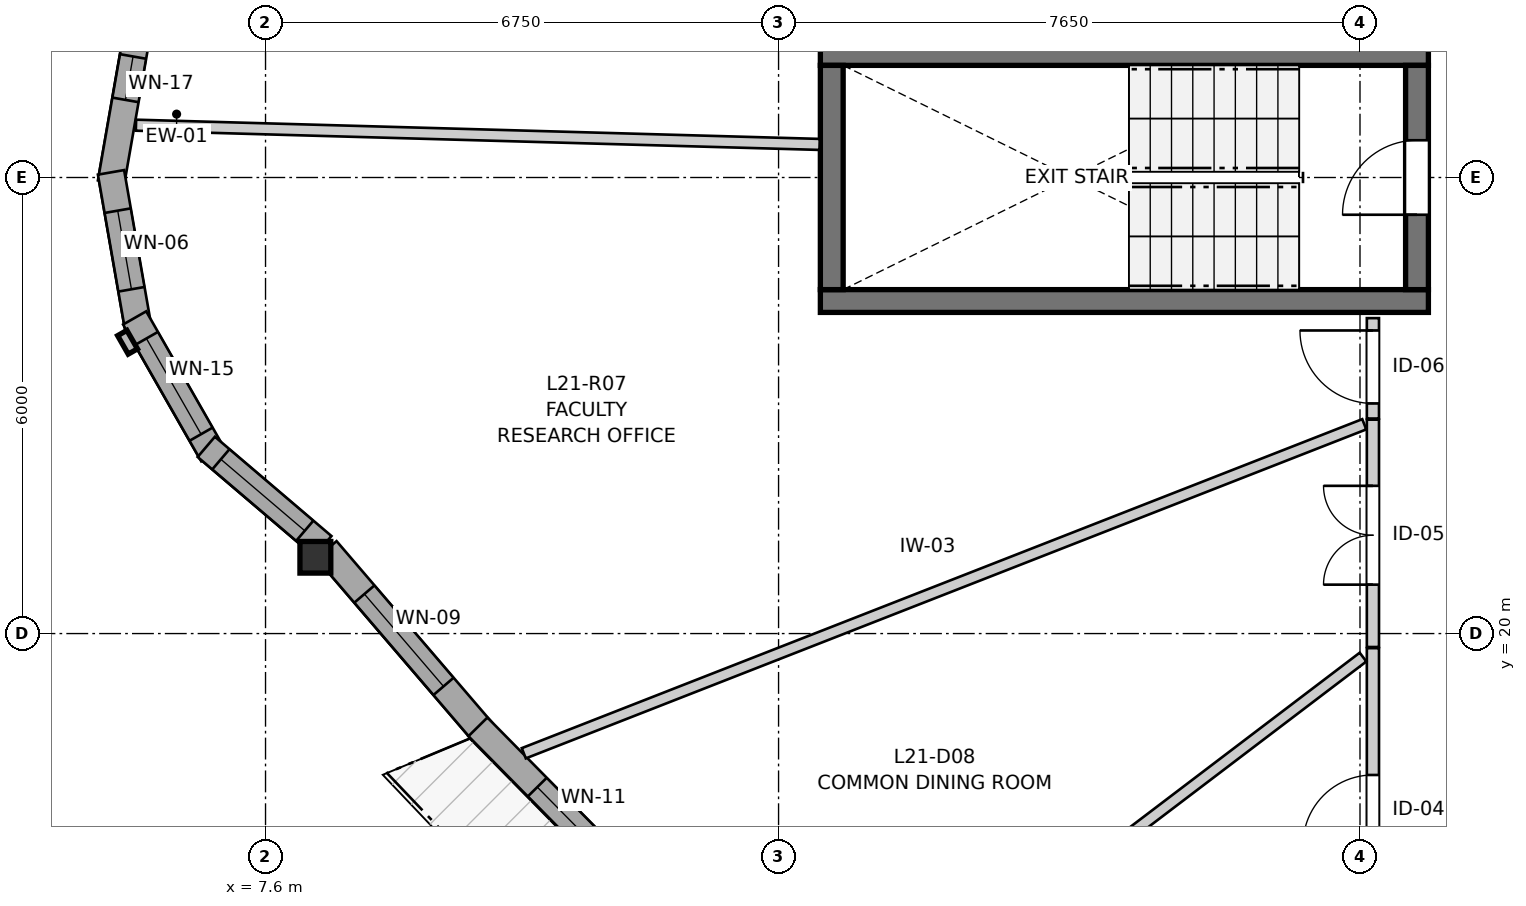
"""IFC4 building model, lengths in metres.
Left out: names, types, materials, properties, quantities, classifications, styles, units other than length and angle.
Written with IfcOpenShell. Run it as: python <this file> out.ifc"""

import sys

from ifc_helpers import new_model, si_unit, direction, frame, frame_2d, origin, origin_2d, place, context, subcontext, project, spatial, rectangle, i_section, extrude, source, transform, mapped, element, fill, save


model = new_model("IFC4")
c1 = context("Model", 3, precision=1e-05, world=origin(), true_north=direction((0.0, 1.0)))
c2 = subcontext(c1, "Body", "Model", "MODEL_VIEW")
j1 = project(units=[si_unit("LENGTHUNIT", "METRE"), si_unit("PLANEANGLEUNIT", "RADIAN")], contexts=[c1])
p1 = place(None, origin())
s1 = spatial("IfcSite", under=j1, at=p1, CompositionType="ELEMENT")
p2 = place(p1, origin())
s2 = spatial("IfcBuilding", under=s1, at=p2, CompositionType="ELEMENT")
p3 = place(p2, frame((0.0, 0.0, 73.6)))
s3 = spatial("IfcBuildingStorey", under=s2, at=p3, CompositionType="ELEMENT", Elevation=73.6)
for number, where, z_axis, x_axis in (
    (1, (14.9, 24.375, 0.0), (0.0, 0.0, 1.0), (1.0, 0.0, 0.0)),
    (2, (22.9, 27.625, 0.0), (0.0, 0.0, 1.0), (-1.0, 0.0, 0.0)),
):
    element("IfcWall", number, at=place(p3, frame(where, z_axis=z_axis, x_axis=x_axis)), inside=s3, PredefinedType="SHEAR", context=c2, shape_type="SweptSolid", body=[
        extrude(rectangle(XDim=8.0, YDim=0.3, at=frame_2d((4.0, 0.0))), origin(), (0.0, 0.0, 1.0), 2.95),
    ])
p4 = place(p3, frame((15.05, 27.475, 0.0), z_axis=(0.0, 0.0, 1.0), x_axis=(0.0, -1.0, 0.0)))
e3 = element("IfcWall", 3, at=p4, inside=s3, PredefinedType="SHEAR", context=c2, shape_type="SweptSolid", body=[
    extrude(rectangle(XDim=2.95, YDim=0.3, at=frame_2d((1.475, 0.0))), origin(), (0.0, 0.0, 1.0), 2.95),
])
p5 = place(p3, frame((22.75, 24.525, 0.0), z_axis=(0.0, 0.0, 1.0), x_axis=(0.0, 1.0, 0.0)))
e4 = element("IfcWall", 4, at=p5, inside=s3, PredefinedType="SHEAR", context=c2, shape_type="SweptSolid", body=[
    extrude(rectangle(XDim=2.95, YDim=0.3, at=frame_2d((1.475, 0.0))), origin(), (0.0, 0.0, 1.0), 2.95),
])
p6 = place(p5, frame((0.985, 0.0, 0.0)))
e5 = element("IfcOpeningElement", 5, at=p6, cuts=e4, PredefinedType="OPENING", context=c2, shape_type="SweptSolid", body=[
    extrude(rectangle(XDim=0.98, YDim=2.15, at=frame_2d((0.49, 1.075))), frame((0.0, 0.16, 0.0), z_axis=(0.0, -1.0, 0.0), x_axis=(1.0, 0.0, 0.0)), (0.0, 0.0, 1.0), 0.32),
])
m1 = source(origin(), c2, "Body", "SweptSolid", [
    extrude(i_section(OverallWidth=0.406, OverallDepth=0.416, WebThickness=0.027, FlangeThickness=0.044, FilletRadius=0.015, at=origin_2d()), origin(), (0.0, 0.0, 1.0), 2.95),
])
p7 = place(p3, frame((8.256, 21.003, 0.0), z_axis=(0.0, 0.0, 1.0), x_axis=(1.0, 0.0, 0.0)))
e6 = element("IfcColumn", 6, at=p7, inside=s3, PredefinedType="PILASTER", context=c2, shape_type="MappedRepresentation", body=[
    mapped(m1, transform((0.0, 0.0, 0.0), x_axis=(1.0, 0.0, 0.0), y_axis=(0.0, 1.0, 0.0), z_axis=(0.0, 0.0, 1.0), scale=1.0)),
])
p8 = place(p3, frame((5.924, 27.975, 0.0), z_axis=(0.0, 0.0, 1.0), x_axis=(-0.172166087538, -0.985067935881, 0.0)))
e7 = element("IfcWall", 7, at=p8, inside=s3, PredefinedType="SOLIDWALL", context=c2, shape_type="SweptSolid", body=[
    extrude(rectangle(XDim=2.073, YDim=0.35, at=frame_2d((1.037, 0.0))), origin(), (0.0, 0.0, 1.0), 2.48),
])
p9 = place(p8, frame((0.388, 0.0, 0.82)))
e8 = element("IfcOpeningElement", 8, at=p9, cuts=e7, PredefinedType="OPENING", context=c2, shape_type="SweptSolid", body=[
    extrude(rectangle(XDim=0.58, YDim=1.35, at=frame_2d((0.29, 0.675))), frame((0.0, 0.185, 0.0), z_axis=(0.0, -1.0, 0.0), x_axis=(1.0, 0.0, 0.0)), (0.0, 0.0, 1.0), 0.37),
])
p10 = place(p3, frame((5.567, 26.068, 0.0), z_axis=(0.0, 0.0, 1.0), x_axis=(0.172166087538, -0.985067935881, 0.0)))
e9 = element("IfcWall", 9, at=p10, inside=s3, PredefinedType="SOLIDWALL", context=c2, shape_type="SweptSolid", body=[
    extrude(rectangle(XDim=2.073, YDim=0.35, at=frame_2d((1.037, 0.0))), origin(), (0.0, 0.0, 1.0), 2.48),
])
p11 = place(p10, frame((0.511, 0.0, 0.82)))
e10 = element("IfcOpeningElement", 10, at=p11, cuts=e9, PredefinedType="OPENING", context=c2, shape_type="SweptSolid", body=[
    extrude(rectangle(XDim=1.05, YDim=1.45, at=frame_2d((0.525, 0.725))), frame((0.0, 0.185, 0.0), z_axis=(0.0, -1.0, 0.0), x_axis=(1.0, 0.0, 0.0)), (0.0, 0.0, 1.0), 0.37),
])
p12 = place(p3, frame((5.878, 24.153, 0.0), z_axis=(0.0, 0.0, 1.0), x_axis=(0.496037473582, -0.868301114132, 0.0)))
e11 = element("IfcWall", 11, at=p12, inside=s3, PredefinedType="SOLIDWALL", context=c2, shape_type="SweptSolid", body=[
    extrude(rectangle(XDim=2.073, YDim=0.35, at=frame_2d((1.037, 0.0))), origin(), (0.0, 0.0, 1.0), 2.48),
])
p13 = place(p12, frame((0.312, 0.0, 0.82)))
e12 = element("IfcOpeningElement", 12, at=p13, cuts=e11, PredefinedType="OPENING", context=c2, shape_type="SweptSolid", body=[
    extrude(rectangle(XDim=1.45, YDim=1.25, at=frame_2d((0.725, 0.625))), frame((0.0, 0.185, 0.0), z_axis=(0.0, -1.0, 0.0), x_axis=(1.0, 0.0, 0.0)), (0.0, 0.0, 1.0), 0.37),
])
p14 = place(p3, frame((6.82, 22.457, 0.0), z_axis=(0.0, 0.0, 1.0), x_axis=(0.76114353683, -0.648583469063, 0.0)))
e13 = element("IfcWall", 13, at=p14, inside=s3, PredefinedType="SOLIDWALL", context=c2, shape_type="SweptSolid", body=[
    extrude(rectangle(XDim=2.015, YDim=0.35, at=frame_2d((1.007, 0.0))), origin(), (0.0, 0.0, 1.0), 2.48),
])
p15 = place(p14, frame((0.252, 0.0, 0.82)))
e14 = element("IfcOpeningElement", 14, at=p15, cuts=e13, PredefinedType="OPENING", context=c2, shape_type="SweptSolid", body=[
    extrude(rectangle(XDim=1.45, YDim=1.25, at=frame_2d((0.725, 0.625))), frame((0.0, 0.185, 0.0), z_axis=(0.0, -1.0, 0.0), x_axis=(1.0, 0.0, 0.0)), (0.0, 0.0, 1.0), 0.37),
])
p16 = place(p3, frame((8.402, 21.102, 0.0), z_axis=(0.0, 0.0, 1.0), x_axis=(0.650797748491, -0.759251138004, 0.0)))
e15 = element("IfcWall", 15, at=p16, inside=s3, PredefinedType="SOLIDWALL", context=c2, shape_type="SweptSolid", body=[
    extrude(rectangle(XDim=3.154, YDim=0.35, at=frame_2d((1.577, 0.0))), origin(), (0.0, 0.0, 1.0), 2.48),
])
p17 = place(p16, frame((0.767, 0.0, 0.82)))
e16 = element("IfcOpeningElement", 16, at=p17, cuts=e15, PredefinedType="OPENING", context=c2, shape_type="SweptSolid", body=[
    extrude(rectangle(XDim=1.6, YDim=1.35, at=frame_2d((0.8, 0.675))), frame((0.0, 0.185, 0.0), z_axis=(0.0, -1.0, 0.0), x_axis=(1.0, 0.0, 0.0)), (0.0, 0.0, 1.0), 0.37),
])
p18 = place(p3, frame((10.394, 18.773, 0.0), z_axis=(0.0, 0.0, 1.0), x_axis=(0.701965316192, -0.712211130819, 0.0)))
e17 = element("IfcWall", 17, at=p18, inside=s3, PredefinedType="SOLIDWALL", context=c2, shape_type="SweptSolid", body=[
    extrude(rectangle(XDim=2.883, YDim=0.35, at=frame_2d((1.442, 0.0))), origin(), (0.0, 0.0, 1.0), 2.48),
])
p19 = place(p18, frame((1.113, 0.0, 0.82)))
e18 = element("IfcOpeningElement", 18, at=p19, cuts=e17, PredefinedType="OPENING", context=c2, shape_type="SweptSolid", body=[
    extrude(rectangle(XDim=1.25, YDim=1.35, at=frame_2d((0.625, 0.675))), frame((0.0, 0.185, 0.0), z_axis=(0.0, -1.0, 0.0), x_axis=(1.0, 0.0, 0.0)), (0.0, 0.0, 1.0), 0.37),
])
p20 = place(p3, frame((22.17, 15.57, 0.0), z_axis=(0.0, 0.0, 1.0), x_axis=(0.0, 1.0, 0.0)))
e19 = element("IfcWall", 19, at=p20, inside=s3, PredefinedType="PARTITIONING", context=c2, shape_type="SweptSolid", body=[
    extrude(rectangle(XDim=4.238, YDim=0.16, at=frame_2d((2.119, 0.0))), origin(), (0.0, 0.0, 1.0), 2.95),
])
p21 = place(p20, frame((1.649, 0.0, 0.0)))
e20 = element("IfcOpeningElement", 20, at=p21, cuts=e19, PredefinedType="OPENING", context=c2, shape_type="SweptSolid", body=[
    extrude(rectangle(XDim=0.92, YDim=2.1, at=frame_2d((0.46, 1.05))), frame((0.0, 0.09, 0.0), z_axis=(0.0, -1.0, 0.0), x_axis=(1.0, 0.0, 0.0)), (0.0, 0.0, 1.0), 0.18),
])
p22 = place(p3, frame((22.17, 19.823, 0.0), z_axis=(0.0, 0.0, 1.0), x_axis=(0.0, 1.0, 0.0)))
e21 = element("IfcWall", 21, at=p22, inside=s3, PredefinedType="PARTITIONING", context=c2, shape_type="SweptSolid", body=[
    extrude(rectangle(XDim=2.991, YDim=0.16, at=frame_2d((1.496, 0.0))), origin(), (0.0, 0.0, 1.0), 2.95),
])
p23 = place(p22, frame((0.821, 0.0, 0.0)))
e22 = element("IfcOpeningElement", 22, at=p23, cuts=e21, PredefinedType="OPENING", context=c2, shape_type="SweptSolid", body=[
    extrude(rectangle(XDim=1.3, YDim=2.1, at=frame_2d((0.65, 1.05))), frame((0.0, 0.09, 0.0), z_axis=(0.0, -1.0, 0.0), x_axis=(1.0, 0.0, 0.0)), (0.0, 0.0, 1.0), 0.18),
])
p24 = place(p3, frame((22.17, 22.829, 0.0), z_axis=(0.0, 0.0, 1.0), x_axis=(0.0, 1.0, 0.0)))
e23 = element("IfcWall", 23, at=p24, inside=s3, PredefinedType="PARTITIONING", context=c2, shape_type="SweptSolid", body=[
    extrude(rectangle(XDim=1.321, YDim=0.16, at=frame_2d((0.66, 0.0))), origin(), (0.0, 0.0, 1.0), 2.95),
])
p25 = place(p24, frame((0.198, 0.0, 0.0)))
e24 = element("IfcOpeningElement", 24, at=p25, cuts=e23, PredefinedType="OPENING", context=c2, shape_type="SweptSolid", body=[
    extrude(rectangle(XDim=0.96, YDim=2.1, at=frame_2d((0.48, 1.05))), frame((0.0, 0.09, 0.0), z_axis=(0.0, -1.0, 0.0), x_axis=(1.0, 0.0, 0.0)), (0.0, 0.0, 1.0), 0.18),
])
p26 = place(p3, frame((10.998, 18.425, 0.0), z_axis=(0.0, 0.0, 1.0), x_axis=(0.931213049878, 0.364475315676, 0.0)))
e25 = element("IfcWall", 25, at=p26, inside=s3, PredefinedType="PARTITIONING", context=c2, shape_type="SweptSolid", body=[
    extrude(rectangle(XDim=11.875, YDim=0.145, at=frame_2d((5.938, 0.0))), origin(), (0.0, 0.0, 1.0), 2.95),
])
p27 = place(p3, frame((5.896, 26.688, 0.0), z_axis=(0.0, 0.0, 1.0), x_axis=(0.999604843423, -0.028109731489, 0.0)))
e26 = element("IfcWall", 26, at=p27, inside=s3, PredefinedType="PARTITIONING", context=c2, shape_type="SweptSolid", body=[
    extrude(rectangle(XDim=8.998, YDim=0.145, at=frame_2d((4.499, 0.0))), origin(), (0.0, 0.0, 1.0), 2.95),
])
p28 = place(p3, frame((15.239, 14.526, 0.0), z_axis=(0.0, 0.0, 1.0), x_axis=(0.796393529077, 0.604778758592, 0.0)))
e27 = element("IfcWall", 27, at=p28, inside=s3, PredefinedType="PARTITIONING", context=c2, shape_type="SweptSolid", body=[
    extrude(rectangle(XDim=8.539, YDim=0.145, at=frame_2d((4.27, 0.0))), origin(), (0.0, 0.0, 1.0), 2.95),
])
m2 = source(origin(), c2, "Body", "SweptSolid", [
    extrude(rectangle(XDim=0.58, YDim=1.35, at=frame_2d((0.29, 0.675))), frame((0.0, 0.03, 0.0), z_axis=(0.0, -1.0, 0.0), x_axis=(1.0, 0.0, 0.0)), (0.0, 0.0, 1.0), 0.06),
])
p29 = place(p9, origin())
e28 = element("IfcWindow", 28, at=p29, inside=s3, PartitioningType="SINGLE_PANEL", PredefinedType="WINDOW", context=c2, shape_type="MappedRepresentation", body=[
    mapped(m2, transform((0.0, 0.0, 0.0), x_axis=(1.0, 0.0, 0.0), y_axis=(0.0, 1.0, 0.0), z_axis=(0.0, 0.0, 1.0), scale=1.0)),
])
fill(e8, e28)
m3 = source(origin(), c2, "Body", "SweptSolid", [
    extrude(rectangle(XDim=1.05, YDim=1.45, at=frame_2d((0.525, 0.725))), frame((0.0, 0.03, 0.0), z_axis=(0.0, -1.0, 0.0), x_axis=(1.0, 0.0, 0.0)), (0.0, 0.0, 1.0), 0.06),
])
p30 = place(p11, origin())
e29 = element("IfcWindow", 29, at=p30, inside=s3, PartitioningType="SINGLE_PANEL", PredefinedType="WINDOW", context=c2, shape_type="MappedRepresentation", body=[
    mapped(m3, transform((0.0, 0.0, 0.0), x_axis=(1.0, 0.0, 0.0), y_axis=(0.0, 1.0, 0.0), z_axis=(0.0, 0.0, 1.0), scale=1.0)),
])
fill(e10, e29)
m4 = source(origin(), c2, "Body", "SweptSolid", [
    extrude(rectangle(XDim=1.45, YDim=1.25, at=frame_2d((0.725, 0.625))), frame((0.0, 0.03, 0.0), z_axis=(0.0, -1.0, 0.0), x_axis=(1.0, 0.0, 0.0)), (0.0, 0.0, 1.0), 0.06),
])
p31 = place(p13, origin())
e30 = element("IfcWindow", 30, at=p31, inside=s3, PartitioningType="SINGLE_PANEL", PredefinedType="WINDOW", context=c2, shape_type="MappedRepresentation", body=[
    mapped(m4, transform((0.0, 0.0, 0.0), x_axis=(1.0, 0.0, 0.0), y_axis=(0.0, 1.0, 0.0), z_axis=(0.0, 0.0, 1.0), scale=1.0)),
])
fill(e12, e30)
p32 = place(p15, origin())
e31 = element("IfcWindow", 31, at=p32, inside=s3, PartitioningType="SINGLE_PANEL", PredefinedType="WINDOW", context=c2, shape_type="MappedRepresentation", body=[
    mapped(m4, transform((0.0, 0.0, 0.0), x_axis=(1.0, 0.0, 0.0), y_axis=(0.0, 1.0, 0.0), z_axis=(0.0, 0.0, 1.0), scale=1.0)),
])
fill(e14, e31)
m5 = source(origin(), c2, "Body", "SweptSolid", [
    extrude(rectangle(XDim=1.6, YDim=1.35, at=frame_2d((0.8, 0.675))), frame((0.0, 0.03, 0.0), z_axis=(0.0, -1.0, 0.0), x_axis=(1.0, 0.0, 0.0)), (0.0, 0.0, 1.0), 0.06),
])
p33 = place(p17, origin())
e32 = element("IfcWindow", 32, at=p33, inside=s3, PartitioningType="SINGLE_PANEL", PredefinedType="WINDOW", context=c2, shape_type="MappedRepresentation", body=[
    mapped(m5, transform((0.0, 0.0, 0.0), x_axis=(1.0, 0.0, 0.0), y_axis=(0.0, 1.0, 0.0), z_axis=(0.0, 0.0, 1.0), scale=1.0)),
])
fill(e16, e32)
m6 = source(origin(), c2, "Body", "SweptSolid", [
    extrude(rectangle(XDim=1.25, YDim=1.35, at=frame_2d((0.625, 0.675))), frame((0.0, 0.03, 0.0), z_axis=(0.0, -1.0, 0.0), x_axis=(1.0, 0.0, 0.0)), (0.0, 0.0, 1.0), 0.06),
])
p34 = place(p19, origin())
e33 = element("IfcWindow", 33, at=p34, inside=s3, PartitioningType="SINGLE_PANEL", PredefinedType="WINDOW", context=c2, shape_type="MappedRepresentation", body=[
    mapped(m6, transform((0.0, 0.0, 0.0), x_axis=(1.0, 0.0, 0.0), y_axis=(0.0, 1.0, 0.0), z_axis=(0.0, 0.0, 1.0), scale=1.0)),
])
fill(e18, e33)
m7 = source(origin(), c2, "Body", "SweptSolid", [
    extrude(rectangle(XDim=0.98, YDim=2.15, at=frame_2d((0.49, 1.075))), frame((0.0, 0.025, 0.0), z_axis=(0.0, -1.0, 0.0), x_axis=(1.0, 0.0, 0.0)), (0.0, 0.0, 1.0), 0.05),
])
p35 = place(p6, origin())
e34 = element("IfcDoor", 34, at=p35, inside=s3, OperationType="SINGLE_SWING_LEFT", PredefinedType="DOOR", context=c2, shape_type="MappedRepresentation", body=[
    mapped(m7, transform((0.0, 0.0, 0.0), x_axis=(1.0, 0.0, 0.0), y_axis=(0.0, 1.0, 0.0), z_axis=(0.0, 0.0, 1.0), scale=1.0)),
])
fill(e5, e34)
m8 = source(origin(), c2, "Body", "SweptSolid", [
    extrude(rectangle(XDim=0.92, YDim=2.1, at=frame_2d((0.46, 1.05))), frame((0.0, 0.025, 0.0), z_axis=(0.0, -1.0, 0.0), x_axis=(1.0, 0.0, 0.0)), (0.0, 0.0, 1.0), 0.05),
])
p36 = place(p21, origin())
e35 = element("IfcDoor", 35, at=p36, inside=s3, OperationType="SINGLE_SWING_LEFT", PredefinedType="DOOR", context=c2, shape_type="MappedRepresentation", body=[
    mapped(m8, transform((0.0, 0.0, 0.0), x_axis=(1.0, 0.0, 0.0), y_axis=(0.0, 1.0, 0.0), z_axis=(0.0, 0.0, 1.0), scale=1.0)),
])
fill(e20, e35)
m9 = source(origin(), c2, "Body", "SweptSolid", [
    extrude(rectangle(XDim=1.3, YDim=2.1, at=frame_2d((0.65, 1.05))), frame((0.0, 0.025, 0.0), z_axis=(0.0, -1.0, 0.0), x_axis=(1.0, 0.0, 0.0)), (0.0, 0.0, 1.0), 0.05),
])
p37 = place(p23, origin())
e36 = element("IfcDoor", 36, at=p37, inside=s3, OperationType="DOUBLE_DOOR_SINGLE_SWING", PredefinedType="DOOR", context=c2, shape_type="MappedRepresentation", body=[
    mapped(m9, transform((0.0, 0.0, 0.0), x_axis=(1.0, 0.0, 0.0), y_axis=(0.0, 1.0, 0.0), z_axis=(0.0, 0.0, 1.0), scale=1.0)),
])
fill(e22, e36)
m10 = source(origin(), c2, "Body", "SweptSolid", [
    extrude(rectangle(XDim=0.96, YDim=2.1, at=frame_2d((0.48, 1.05))), frame((0.0, 0.025, 0.0), z_axis=(0.0, -1.0, 0.0), x_axis=(1.0, 0.0, 0.0)), (0.0, 0.0, 1.0), 0.05),
])
p38 = place(p25, origin())
e37 = element("IfcDoor", 37, at=p38, inside=s3, OperationType="SINGLE_SWING_RIGHT", PredefinedType="DOOR", context=c2, shape_type="MappedRepresentation", body=[
    mapped(m10, transform((0.0, 0.0, 0.0), x_axis=(1.0, 0.0, 0.0), y_axis=(0.0, 1.0, 0.0), z_axis=(0.0, 0.0, 1.0), scale=1.0)),
])
fill(e24, e37)
save(model, sys.argv[1])
